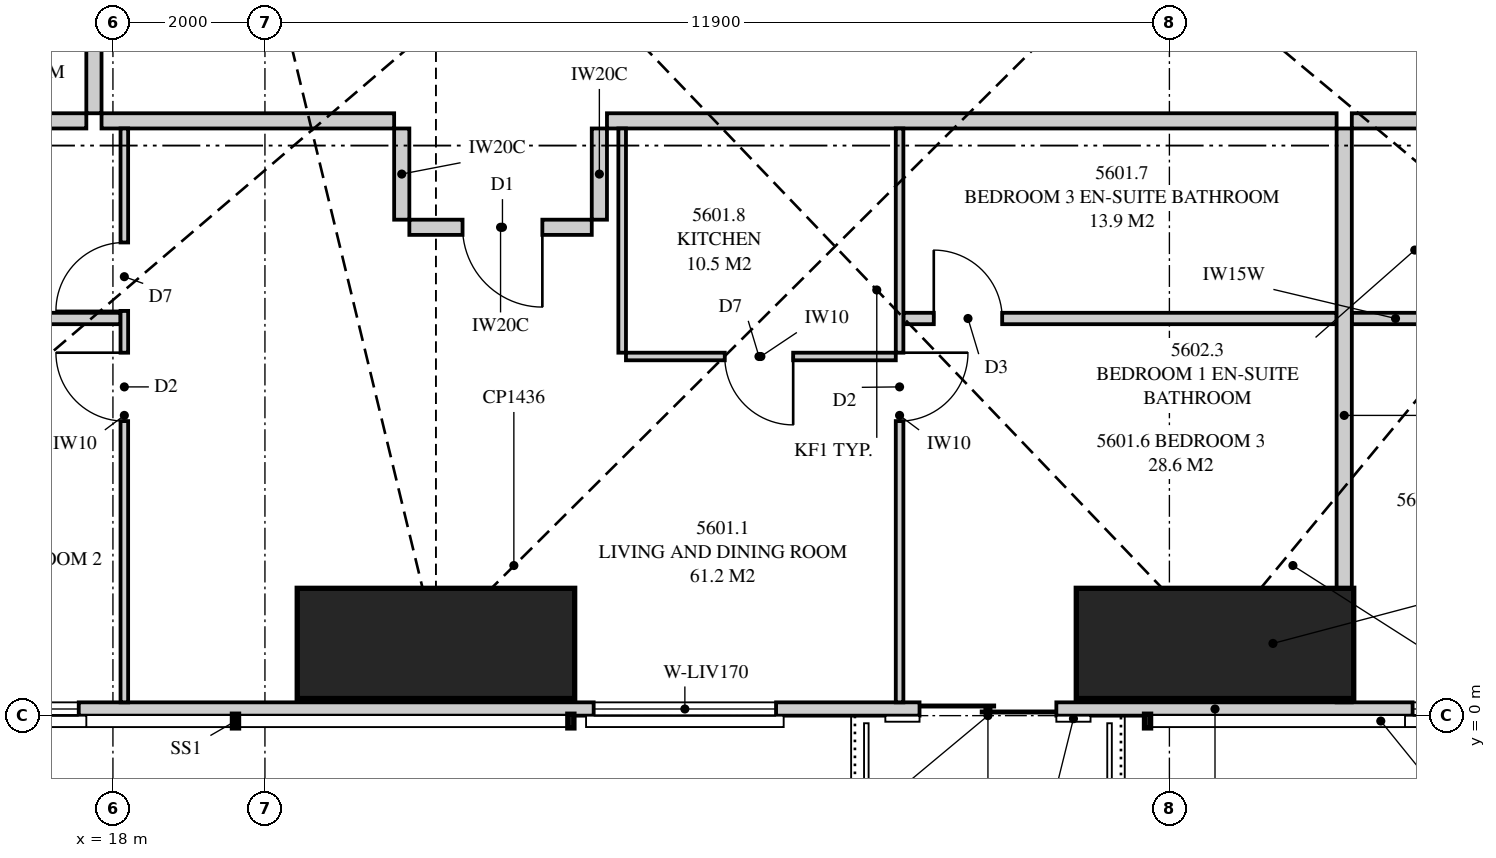
"""IFC4 building model, lengths in metres.
Left out: names, types, materials, properties, quantities, classifications, styles, units other than length and angle.
Written with IfcOpenShell. Run it as: python <this file> out.ifc"""

import sys

from ifc_helpers import new_model, si_unit, direction, frame, frame_2d, origin, origin_2d, place, context, subcontext, project, spatial, polyline, rectangle, outline, extrude, element, fill, save


model = new_model("IFC4")
c1 = context("Model", 3, precision=1e-05, world=origin(), true_north=direction((0.0, 1.0)))
c2 = subcontext(c1, "Body", "Model", "MODEL_VIEW")
j1 = project(units=[si_unit("LENGTHUNIT", "METRE"), si_unit("PLANEANGLEUNIT", "RADIAN")], contexts=[c1])
p1 = place(None, origin())
s1 = spatial("IfcSite", under=j1, at=p1, CompositionType="ELEMENT")
p2 = place(p1, origin())
s2 = spatial("IfcBuilding", under=s1, at=p2, CompositionType="ELEMENT")
p3 = place(p2, frame((0.0, 0.0, 204.6)))
s3 = spatial("IfcBuildingStorey", under=s2, at=p3, CompositionType="ELEMENT", Elevation=204.6)
for number, where, z_axis, x_axis in (
    (1, (22.25, 0.95, 0.0), (0.0, 0.0, 1.0), (0.0, 1.0, 0.0)),
    (2, (32.5, 0.95, 0.0), (0.0, 0.0, 1.0), (0.0, 1.0, 0.0)),
):
    element("IfcColumn", number, at=place(p3, frame(where, z_axis=z_axis, x_axis=x_axis)), inside=s3, PredefinedType="COLUMN", context=c2, shape_type="SweptSolid", body=[
        extrude(rectangle(XDim=1.45, YDim=3.65, at=origin_2d()), origin(), (0.0, 0.0, 1.0), 3.35),
    ])
p4 = place(p3, frame((15.051, 0.087, 0.0), z_axis=(0.0, 0.0, 1.0), x_axis=(1.0, 0.0, 0.0)))
e3 = element("IfcWall", 3, at=p4, inside=s3, PredefinedType="SOLIDWALL", context=c2, shape_type="SweptSolid", body=[
    extrude(rectangle(XDim=34.897, YDim=0.175, at=frame_2d((17.449, 0.0))), origin(), (0.0, 0.0, 1.0), 3.07),
])
p5 = place(p4, frame((0.699, 0.0, 0.4)))
e4 = element("IfcOpeningElement", 4, at=p5, cuts=e3, PredefinedType="OPENING", context=c2, shape_type="SweptSolid", body=[
    extrude(rectangle(XDim=1.8, YDim=1.7, at=frame_2d((0.9, 0.85))), frame((0.0, 0.097, 0.0), z_axis=(0.0, -1.0, 0.0), x_axis=(1.0, 0.0, 0.0)), (0.0, 0.0, 1.0), 0.195),
])
p6 = place(p4, frame((9.274, 0.0, 0.4)))
e5 = element("IfcOpeningElement", 5, at=p6, cuts=e3, PredefinedType="OPENING", context=c2, shape_type="SweptSolid", body=[
    extrude(rectangle(XDim=2.4, YDim=1.7, at=frame_2d((1.2, 0.85))), frame((0.0, 0.097, 0.0), z_axis=(0.0, -1.0, 0.0), x_axis=(1.0, 0.0, 0.0)), (0.0, 0.0, 1.0), 0.195),
])
p7 = place(p4, frame((13.561, 0.0, 0.0)))
e6 = element("IfcOpeningElement", 6, at=p7, cuts=e3, PredefinedType="OPENING", context=c2, shape_type="SweptSolid", body=[
    extrude(rectangle(XDim=1.8, YDim=2.1, at=frame_2d((0.9, 1.05))), frame((0.0, 0.097, 0.0), z_axis=(0.0, -1.0, 0.0), x_axis=(1.0, 0.0, 0.0)), (0.0, 0.0, 1.0), 0.195),
])
p8 = place(p4, frame((20.049, 0.0, 0.4)))
e7 = element("IfcOpeningElement", 7, at=p8, cuts=e3, PredefinedType="OPENING", context=c2, shape_type="SweptSolid", body=[
    extrude(rectangle(XDim=1.8, YDim=1.7, at=frame_2d((0.9, 0.85))), frame((0.0, 0.097, 0.0), z_axis=(0.0, -1.0, 0.0), x_axis=(1.0, 0.0, 0.0)), (0.0, 0.0, 1.0), 0.195),
])
p9 = place(p4, frame((23.649, 0.0, 0.4)))
e8 = element("IfcOpeningElement", 8, at=p9, cuts=e3, PredefinedType="OPENING", context=c2, shape_type="SweptSolid", body=[
    extrude(rectangle(XDim=1.8, YDim=1.7, at=frame_2d((0.9, 0.85))), frame((0.0, 0.097, 0.0), z_axis=(0.0, -1.0, 0.0), x_axis=(1.0, 0.0, 0.0)), (0.0, 0.0, 1.0), 0.195),
])
p10 = place(p4, frame((29.625, 0.0, 0.4)))
e9 = element("IfcOpeningElement", 9, at=p10, cuts=e3, PredefinedType="OPENING", context=c2, shape_type="SweptSolid", body=[
    extrude(rectangle(XDim=1.8, YDim=1.7, at=frame_2d((0.9, 0.85))), frame((0.0, 0.097, 0.0), z_axis=(0.0, -1.0, 0.0), x_axis=(1.0, 0.0, 0.0)), (0.0, 0.0, 1.0), 0.195),
])
p11 = place(p4, frame((32.51, 0.0, 0.4)))
e10 = element("IfcOpeningElement", 10, at=p11, cuts=e3, PredefinedType="OPENING", context=c2, shape_type="SweptSolid", body=[
    extrude(rectangle(XDim=1.8, YDim=1.7, at=frame_2d((0.9, 0.85))), frame((0.0, 0.097, 0.0), z_axis=(0.0, -1.0, 0.0), x_axis=(1.0, 0.0, 0.0)), (0.0, 0.0, 1.0), 0.195),
])
p12 = place(p3, frame((34.2, 0.175, 0.0), z_axis=(0.0, 0.0, 1.0), x_axis=(0.0, 1.0, 0.0)))
e11 = element("IfcWall", 11, at=p12, inside=s3, PredefinedType="PARTITIONING", context=c2, shape_type="SweptSolid", body=[
    extrude(outline(polyline([(0.0, 0.0), (7.55, 0.0), (7.55, 2.491), (7.515, 2.491), (7.515, 3.07), (3.319, 3.07), (3.319, 2.491), (2.337, 2.491), (2.337, 3.07), (1.275, 3.07), (1.275, 2.07), (0.275, 2.07), (0.275, 3.07), (0.0, 3.07), (0.0, 0.0)])), frame((0.0, 0.1, 0.0), z_axis=(0.0, -1.0, 0.0), x_axis=(1.0, 0.0, 0.0)), (0.0, 0.0, 1.0), 0.2),
])
p13 = place(p3, frame((17.85, 7.825, 0.0), z_axis=(0.0, 0.0, 1.0), x_axis=(1.0, 0.0, 0.0)))
e12 = element("IfcWall", 12, at=p13, inside=s3, PredefinedType="PARTITIONING", context=c2, shape_type="SweptSolid", body=[
    extrude(outline(polyline([(0.0, 0.0), (3.85, 0.0), (3.85, 2.47), (3.69, 2.47), (3.69, 3.07), (3.392, 3.07), (3.392, 2.491), (2.43, 2.491), (2.43, 3.07), (0.0, 3.07), (0.0, 0.0)])), frame((0.0, 0.1, 0.0), z_axis=(0.0, -1.0, 0.0), x_axis=(1.0, 0.0, 0.0)), (0.0, 0.0, 1.0), 0.2),
])
p14 = place(p3, frame((18.15, 0.175, 0.0), z_axis=(0.0, 0.0, 1.0), x_axis=(0.0, 1.0, 0.0)))
e13 = element("IfcWall", 13, at=p14, inside=s3, PredefinedType="PARTITIONING", context=c2, shape_type="SweptSolid", body=[
    extrude(outline(polyline([(0.0, 0.0), (7.55, 0.0), (7.55, 3.07), (5.774, 3.07), (5.774, 2.491), (5.067, 2.491), (5.067, 3.07), (2.017, 3.07), (2.017, 2.07), (0.984, 2.07), (0.984, 3.07), (0.0, 3.07), (0.0, 0.0)])), frame((0.0, 0.05, 0.0), z_axis=(0.0, -1.0, 0.0), x_axis=(1.0, 0.0, 0.0)), (0.0, 0.0, 1.0), 0.1),
])
p15 = place(p14, frame((3.7, 0.0, 0.0)))
e14 = element("IfcOpeningElement", 14, at=p15, cuts=e13, PredefinedType="OPENING", context=c2, shape_type="SweptSolid", body=[
    extrude(rectangle(XDim=0.9, YDim=2.1, at=frame_2d((0.45, 1.05))), frame((0.0, 0.06, 0.0), z_axis=(0.0, -1.0, 0.0), x_axis=(1.0, 0.0, 0.0)), (0.0, 0.0, 1.0), 0.12),
])
p16 = place(p14, frame((5.15, 0.0, 0.0)))
e15 = element("IfcOpeningElement", 15, at=p16, cuts=e13, PredefinedType="OPENING", context=c2, shape_type="SweptSolid", body=[
    extrude(rectangle(XDim=0.9, YDim=2.1, at=frame_2d((0.45, 1.05))), frame((0.0, 0.06, 0.0), z_axis=(0.0, -1.0, 0.0), x_axis=(1.0, 0.0, 0.0)), (0.0, 0.0, 1.0), 0.12),
])
p17 = place(p3, frame((28.35, 0.175, 0.0), z_axis=(0.0, 0.0, 1.0), x_axis=(0.0, 1.0, 0.0)))
e16 = element("IfcWall", 16, at=p17, inside=s3, PredefinedType="PARTITIONING", context=c2, shape_type="SweptSolid", body=[
    extrude(outline(polyline([(0.0, 0.0), (7.55, 0.0), (7.55, 3.07), (7.225, 3.07), (7.225, 2.491), (6.459, 2.491), (6.459, 3.07), (5.505, 3.07), (5.505, 2.491), (4.718, 2.491), (4.718, 3.07), (1.275, 3.07), (1.275, 2.07), (0.275, 2.07), (0.275, 3.07), (0.0, 3.07), (0.0, 0.0)])), frame((0.0, 0.05, 0.0), z_axis=(0.0, -1.0, 0.0), x_axis=(1.0, 0.0, 0.0)), (0.0, 0.0, 1.0), 0.1),
])
p18 = place(p17, frame((3.7, 0.0, 0.0)))
e17 = element("IfcOpeningElement", 17, at=p18, cuts=e16, PredefinedType="OPENING", context=c2, shape_type="SweptSolid", body=[
    extrude(rectangle(XDim=0.9, YDim=2.1, at=frame_2d((0.45, 1.05))), frame((0.0, 0.06, 0.0), z_axis=(0.0, -1.0, 0.0), x_axis=(1.0, 0.0, 0.0)), (0.0, 0.0, 1.0), 0.12),
])
p19 = place(p3, frame((15.2, 5.225, 0.0), z_axis=(0.0, 0.0, 1.0), x_axis=(1.0, 0.0, 0.0)))
e18 = element("IfcWall", 18, at=p19, inside=s3, PredefinedType="PLUMBINGWALL", context=c2, shape_type="SweptSolid", body=[
    extrude(outline(polyline([(0.0, 0.0), (2.9, 0.0), (2.9, 2.491), (2.065, 2.491), (2.065, 3.07), (0.0, 3.07), (0.0, 0.0)])), frame((0.0, 0.075, 0.0), z_axis=(0.0, -1.0, 0.0), x_axis=(1.0, 0.0, 0.0)), (0.0, 0.0, 1.0), 0.15),
])
p20 = place(p3, frame((28.4, 5.225, 0.0), z_axis=(0.0, 0.0, 1.0), x_axis=(1.0, 0.0, 0.0)))
e19 = element("IfcWall", 19, at=p20, inside=s3, PredefinedType="PLUMBINGWALL", context=c2, shape_type="SweptSolid", body=[
    extrude(outline(polyline([(0.0, 0.0), (5.7, 0.0), (5.7, 3.07), (4.356, 3.07), (4.356, 2.595), (3.844, 2.595), (3.844, 3.07), (0.408, 3.07), (0.408, 2.491), (0.0, 2.491), (0.0, 0.0)])), frame((0.0, 0.075, 0.0), z_axis=(0.0, -1.0, 0.0), x_axis=(1.0, 0.0, 0.0)), (0.0, 0.0, 1.0), 0.15),
])
p21 = place(p20, frame((0.4, 0.0, 0.0)))
e20 = element("IfcOpeningElement", 20, at=p21, cuts=e19, PredefinedType="OPENING", context=c2, shape_type="SweptSolid", body=[
    extrude(rectangle(XDim=0.9, YDim=2.1, at=frame_2d((0.45, 1.05))), frame((0.0, 0.085, 0.0), z_axis=(0.0, -1.0, 0.0), x_axis=(1.0, 0.0, 0.0)), (0.0, 0.0, 1.0), 0.17),
])
p22 = place(p3, frame((24.75, 4.725, 0.0), z_axis=(0.0, 0.0, 1.0), x_axis=(1.0, 0.0, 0.0)))
e21 = element("IfcWall", 21, at=p22, inside=s3, PredefinedType="PARTITIONING", context=c2, shape_type="SweptSolid", body=[
    extrude(outline(polyline([(0.0, 0.0), (3.55, 0.0), (3.55, 3.07), (1.68, 3.07), (1.68, 2.491), (0.91, 2.491), (0.91, 3.07), (0.0, 3.07), (0.0, 0.0)])), frame((0.0, 0.05, 0.0), z_axis=(0.0, -1.0, 0.0), x_axis=(1.0, 0.0, 0.0)), (0.0, 0.0, 1.0), 0.1),
])
p23 = place(p22, frame((1.3, 0.0, 0.0)))
e22 = element("IfcOpeningElement", 22, at=p23, cuts=e21, PredefinedType="OPENING", context=c2, shape_type="SweptSolid", body=[
    extrude(rectangle(XDim=0.9, YDim=2.1, at=frame_2d((0.45, 1.05))), frame((0.0, 0.06, 0.0), z_axis=(0.0, -1.0, 0.0), x_axis=(1.0, 0.0, 0.0)), (0.0, 0.0, 1.0), 0.12),
])
p24 = place(p3, frame((24.7, 4.775, 0.0), z_axis=(0.0, 0.0, 1.0), x_axis=(0.0, 1.0, 0.0)))
e23 = element("IfcWall", 23, at=p24, inside=s3, PredefinedType="PARTITIONING", context=c2, shape_type="SweptSolid", body=[
    extrude(rectangle(XDim=2.95, YDim=0.1, at=frame_2d((1.475, 0.0))), origin(), (0.0, 0.0, 1.0), 3.07),
])
p25 = place(p3, frame((34.3, 7.825, 0.0), z_axis=(0.0, 0.0, 1.0), x_axis=(1.0, 0.0, 0.0)))
e24 = element("IfcWall", 24, at=p25, inside=s3, PredefinedType="PARTITIONING", context=c2, shape_type="SweptSolid", body=[
    extrude(outline(polyline([(0.0, 0.0), (11.65, 0.0), (11.65, 3.07), (9.16, 3.07), (9.16, 2.47), (7.74, 2.47), (7.74, 3.07), (4.282, 3.07), (4.282, 2.491), (3.503, 2.491), (3.503, 3.07), (0.696, 3.07), (0.696, 2.491), (0.0, 2.491), (0.0, 0.0)])), frame((0.0, 0.1, 0.0), z_axis=(0.0, -1.0, 0.0), x_axis=(1.0, 0.0, 0.0)), (0.0, 0.0, 1.0), 0.2),
])
p26 = place(p25, frame((8.8, 0.0, 0.0)))
e25 = element("IfcOpeningElement", 25, at=p26, cuts=e24, PredefinedType="OPENING", context=c2, shape_type="SweptSolid", body=[
    extrude(rectangle(XDim=1.05, YDim=2.2, at=frame_2d((0.525, 1.1))), frame((0.0, 0.11, 0.0), z_axis=(0.0, -1.0, 0.0), x_axis=(1.0, 0.0, 0.0)), (0.0, 0.0, 1.0), 0.22),
])
p27 = place(p3, frame((34.3, 5.225, 0.0), z_axis=(0.0, 0.0, 1.0), x_axis=(1.0, 0.0, 0.0)))
e26 = element("IfcWall", 26, at=p27, inside=s3, PredefinedType="PLUMBINGWALL", context=c2, shape_type="SweptSolid", body=[
    extrude(outline(polyline([(0.0, 0.0), (3.45, 0.0), (3.45, 2.491), (2.866, 2.491), (2.866, 3.07), (2.108, 3.07), (2.108, 2.491), (1.371, 2.491), (1.371, 3.07), (0.0, 3.07), (0.0, 0.0)])), frame((0.0, 0.075, 0.0), z_axis=(0.0, -1.0, 0.0), x_axis=(1.0, 0.0, 0.0)), (0.0, 0.0, 1.0), 0.15),
])
p28 = place(p27, frame((2.15, 0.0, 0.0)))
e27 = element("IfcOpeningElement", 27, at=p28, cuts=e26, PredefinedType="OPENING", context=c2, shape_type="SweptSolid", body=[
    extrude(rectangle(XDim=0.9, YDim=2.1, at=frame_2d((0.45, 1.05))), frame((0.0, 0.085, 0.0), z_axis=(0.0, -1.0, 0.0), x_axis=(1.0, 0.0, 0.0)), (0.0, 0.0, 1.0), 0.17),
])
p29 = place(p3, frame((12.0, 7.825, 0.0), z_axis=(0.0, 0.0, 1.0), x_axis=(1.0, 0.0, 0.0)))
e28 = element("IfcWall", 28, at=p29, inside=s3, PredefinedType="PARTITIONING", context=c2, shape_type="SweptSolid", body=[
    extrude(outline(polyline([(0.0, 0.0), (5.65, 0.0), (5.65, 3.07), (2.147, 3.07), (2.147, 2.07), (1.112, 2.07), (1.112, 3.07), (0.0, 3.07), (0.0, 0.0)])), frame((0.0, 0.1, 0.0), z_axis=(0.0, -1.0, 0.0), x_axis=(1.0, 0.0, 0.0)), (0.0, 0.0, 1.0), 0.2),
])
p30 = place(p3, frame((17.75, 7.925, 0.0), z_axis=(0.0, 0.0, 1.0), x_axis=(0.0, 1.0, 0.0)))
e29 = element("IfcWall", 29, at=p30, inside=s3, PredefinedType="PARTITIONING", context=c2, shape_type="SweptSolid", body=[
    extrude(outline(polyline([(0.0, 0.0), (14.925, 0.0), (14.925, 3.07), (5.287, 3.07), (5.287, 2.595), (4.863, 2.595), (4.863, 3.07), (0.0, 3.07), (0.0, 0.0)])), frame((0.0, 0.1, 0.0), z_axis=(0.0, -1.0, 0.0), x_axis=(1.0, 0.0, 0.0)), (0.0, 0.0, 1.0), 0.2),
])
p31 = place(p30, frame((6.962, 0.0, 0.0)))
e30 = element("IfcOpeningElement", 30, at=p31, cuts=e29, PredefinedType="OPENING", context=c2, shape_type="SweptSolid", body=[
    extrude(rectangle(XDim=1.05, YDim=2.2, at=frame_2d((0.525, 1.1))), frame((0.0, 0.11, 0.0), z_axis=(0.0, -1.0, 0.0), x_axis=(1.0, 0.0, 0.0)), (0.0, 0.0, 1.0), 0.22),
])
p32 = place(p3, frame((24.5, 7.825, 0.0), z_axis=(0.0, 0.0, 1.0), x_axis=(1.0, 0.0, 0.0)))
e31 = element("IfcWall", 31, at=p32, inside=s3, PredefinedType="PARTITIONING", context=c2, shape_type="SweptSolid", body=[
    extrude(outline(polyline([(0.0, 0.0), (9.6, 0.0), (9.6, 2.491), (9.519, 2.491), (9.519, 3.07), (8.257, 3.07), (8.257, 2.595), (7.743, 2.595), (7.743, 3.07), (5.097, 3.07), (5.097, 2.491), (4.227, 2.491), (4.227, 3.07), (1.843, 3.07), (1.843, 2.491), (0.998, 2.491), (0.998, 3.07), (0.0, 3.07), (0.0, 0.0)])), frame((0.0, 0.1, 0.0), z_axis=(0.0, -1.0, 0.0), x_axis=(1.0, 0.0, 0.0)), (0.0, 0.0, 1.0), 0.2),
])
p33 = place(p3, frame((21.9, 6.425, 0.0), z_axis=(0.0, 0.0, 1.0), x_axis=(1.0, 0.0, 0.0)))
e32 = element("IfcWall", 32, at=p33, inside=s3, PredefinedType="PARTITIONING", context=c2, shape_type="SweptSolid", body=[
    extrude(outline(polyline([(0.0, 0.0), (2.4, 0.0), (2.4, 3.07), (1.06, 3.07), (1.06, 2.47), (0.0, 2.47), (0.0, 3.07), (0.0, 0.0)])), frame((0.0, 0.1, 0.0), z_axis=(0.0, -1.0, 0.0), x_axis=(1.0, 0.0, 0.0)), (0.0, 0.0, 1.0), 0.2),
])
p34 = place(p33, frame((0.7, 0.0, 0.0)))
e33 = element("IfcOpeningElement", 33, at=p34, cuts=e32, PredefinedType="OPENING", context=c2, shape_type="SweptSolid", body=[
    extrude(rectangle(XDim=1.05, YDim=2.2, at=frame_2d((0.525, 1.1))), frame((0.0, 0.11, 0.0), z_axis=(0.0, -1.0, 0.0), x_axis=(1.0, 0.0, 0.0)), (0.0, 0.0, 1.0), 0.22),
])
p35 = place(p3, frame((21.8, 7.725, 0.0), z_axis=(0.0, 0.0, 1.0), x_axis=(0.0, -1.0, 0.0)))
e34 = element("IfcWall", 34, at=p35, inside=s3, PredefinedType="PARTITIONING", context=c2, shape_type="SweptSolid", body=[
    extrude(outline(polyline([(0.0, 0.0), (1.2, 0.0), (1.2, 3.07), (1.2, 2.47), (0.0, 2.47), (0.0, 3.07), (0.0, 0.0)])), frame((0.0, 0.1, 0.0), z_axis=(0.0, -1.0, 0.0), x_axis=(1.0, 0.0, 0.0)), (0.0, 0.0, 1.0), 0.2),
])
p36 = place(p3, frame((24.4, 7.725, 0.0), z_axis=(0.0, 0.0, 1.0), x_axis=(0.0, -1.0, 0.0)))
e35 = element("IfcWall", 35, at=p36, inside=s3, PredefinedType="PARTITIONING", context=c2, shape_type="SweptSolid", body=[
    extrude(rectangle(XDim=1.2, YDim=0.2, at=frame_2d((0.6, 0.0))), origin(), (0.0, 0.0, 1.0), 3.07),
])
p37 = place(p5, origin())
e36 = element("IfcWindow", 36, at=p37, inside=s3, PartitioningType="SINGLE_PANEL", PredefinedType="WINDOW", context=c2, shape_type="SweptSolid", body=[
    extrude(rectangle(XDim=1.8, YDim=1.7, at=frame_2d((0.9, 0.85))), frame((0.0, 0.03, 0.0), z_axis=(0.0, -1.0, 0.0), x_axis=(1.0, 0.0, 0.0)), (0.0, 0.0, 1.0), 0.06),
])
fill(e4, e36)
p38 = place(p6, origin())
e37 = element("IfcWindow", 37, at=p38, inside=s3, PartitioningType="SINGLE_PANEL", PredefinedType="WINDOW", context=c2, shape_type="SweptSolid", body=[
    extrude(rectangle(XDim=2.4, YDim=1.7, at=frame_2d((1.2, 0.85))), frame((0.0, 0.03, 0.0), z_axis=(0.0, -1.0, 0.0), x_axis=(1.0, 0.0, 0.0)), (0.0, 0.0, 1.0), 0.06),
])
fill(e5, e37)
p39 = place(p7, origin())
e38 = element("IfcDoor", 38, at=p39, inside=s3, OperationType="SLIDING_TO_LEFT", PredefinedType="DOOR", context=c2, shape_type="SweptSolid", body=[
    extrude(rectangle(XDim=1.8, YDim=2.1, at=frame_2d((0.9, 1.05))), frame((0.0, 0.025, 0.0), z_axis=(0.0, -1.0, 0.0), x_axis=(1.0, 0.0, 0.0)), (0.0, 0.0, 1.0), 0.05),
])
fill(e6, e38)
p40 = place(p8, origin())
e39 = element("IfcWindow", 39, at=p40, inside=s3, PartitioningType="SINGLE_PANEL", PredefinedType="WINDOW", context=c2, shape_type="SweptSolid", body=[
    extrude(rectangle(XDim=1.8, YDim=1.7, at=frame_2d((0.9, 0.85))), frame((0.0, 0.03, 0.0), z_axis=(0.0, -1.0, 0.0), x_axis=(1.0, 0.0, 0.0)), (0.0, 0.0, 1.0), 0.06),
])
fill(e7, e39)
p41 = place(p34, frame((1.05, 0.0, 0.0), z_axis=(0.0, 0.0, 1.0), x_axis=(-1.0, 0.0, 0.0)))
e40 = element("IfcDoor", 40, at=p41, inside=s3, OperationType="SINGLE_SWING_LEFT", PredefinedType="DOOR", context=c2, shape_type="SweptSolid", body=[
    extrude(rectangle(XDim=1.05, YDim=2.2, at=frame_2d((0.525, 1.1))), frame((0.0, 0.025, 0.0), z_axis=(0.0, -1.0, 0.0), x_axis=(1.0, 0.0, 0.0)), (0.0, 0.0, 1.0), 0.05),
])
fill(e33, e40)
p42 = place(p15, origin())
e41 = element("IfcDoor", 41, at=p42, inside=s3, OperationType="SINGLE_SWING_RIGHT", PredefinedType="DOOR", context=c2, shape_type="SweptSolid", body=[
    extrude(rectangle(XDim=0.9, YDim=2.1, at=frame_2d((0.45, 1.05))), frame((0.0, 0.025, 0.0), z_axis=(0.0, -1.0, 0.0), x_axis=(1.0, 0.0, 0.0)), (0.0, 0.0, 1.0), 0.05),
])
fill(e14, e41)
p43 = place(p16, origin())
e42 = element("IfcDoor", 42, at=p43, inside=s3, OperationType="SINGLE_SWING_LEFT", PredefinedType="DOOR", context=c2, shape_type="SweptSolid", body=[
    extrude(rectangle(XDim=0.9, YDim=2.1, at=frame_2d((0.45, 1.05))), frame((0.0, 0.025, 0.0), z_axis=(0.0, -1.0, 0.0), x_axis=(1.0, 0.0, 0.0)), (0.0, 0.0, 1.0), 0.05),
])
fill(e15, e42)
p44 = place(p18, frame((0.9, 0.0, 0.0), z_axis=(0.0, 0.0, 1.0), x_axis=(-1.0, 0.0, 0.0)))
e43 = element("IfcDoor", 43, at=p44, inside=s3, OperationType="SINGLE_SWING_LEFT", PredefinedType="DOOR", context=c2, shape_type="SweptSolid", body=[
    extrude(rectangle(XDim=0.9, YDim=2.1, at=frame_2d((0.45, 1.05))), frame((0.0, 0.025, 0.0), z_axis=(0.0, -1.0, 0.0), x_axis=(1.0, 0.0, 0.0)), (0.0, 0.0, 1.0), 0.05),
])
fill(e17, e43)
p45 = place(p21, origin())
e44 = element("IfcDoor", 44, at=p45, inside=s3, OperationType="SINGLE_SWING_LEFT", PredefinedType="DOOR", context=c2, shape_type="SweptSolid", body=[
    extrude(rectangle(XDim=0.9, YDim=2.1, at=frame_2d((0.45, 1.05))), frame((0.0, 0.025, 0.0), z_axis=(0.0, -1.0, 0.0), x_axis=(1.0, 0.0, 0.0)), (0.0, 0.0, 1.0), 0.05),
])
fill(e20, e44)
p46 = place(p23, frame((0.9, 0.0, 0.0), z_axis=(0.0, 0.0, 1.0), x_axis=(-1.0, 0.0, 0.0)))
e45 = element("IfcDoor", 45, at=p46, inside=s3, OperationType="SINGLE_SWING_LEFT", PredefinedType="DOOR", context=c2, shape_type="SweptSolid", body=[
    extrude(rectangle(XDim=0.9, YDim=2.1, at=frame_2d((0.45, 1.05))), frame((0.0, 0.025, 0.0), z_axis=(0.0, -1.0, 0.0), x_axis=(1.0, 0.0, 0.0)), (0.0, 0.0, 1.0), 0.05),
])
fill(e22, e45)
save(model, sys.argv[1])
